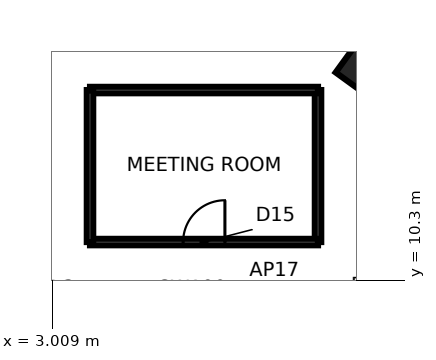
"""IFC4 building model, lengths in metres.
Left out: names, types, materials, properties, quantities, classifications, styles, units other than length and angle.
Written with IfcOpenShell. Run it as: python <this file> out.ifc"""

import sys

from ifc_helpers import new_model, si_unit, direction, frame, frame_2d, origin, origin_2d, place, context, subcontext, project, spatial, rectangle, extrude, element, fill, save


model = new_model("IFC4")
c1 = context("Model", 3, precision=1e-05, world=origin(), true_north=direction((0.0, 1.0)))
c2 = subcontext(c1, "Body", "Model", "MODEL_VIEW")
j1 = project(units=[si_unit("LENGTHUNIT", "METRE"), si_unit("PLANEANGLEUNIT", "RADIAN")], contexts=[c1])
p1 = place(None, origin())
s1 = spatial("IfcSite", under=j1, at=p1, CompositionType="ELEMENT")
p2 = place(p1, origin())
s2 = spatial("IfcBuilding", under=s1, at=p2, CompositionType="ELEMENT")
p3 = place(p2, frame((0.0, 0.0, 162.6)))
s3 = spatial("IfcBuildingStorey", under=s2, at=p3, CompositionType="ELEMENT", Elevation=162.6)
p4 = place(p3, frame((11.581, 15.94, 0.0), z_axis=(0.0, 0.0, 1.0), x_axis=(0.587785252292, 0.809016994375, 0.0)))
e1 = element("IfcColumn", 1, at=p4, inside=s3, PredefinedType="COLUMN", context=c2, shape_type="SweptSolid", body=[
    extrude(rectangle(XDim=1.6, YDim=1.6, at=origin_2d()), origin(), (0.0, 0.0, 1.0), 3.9),
])
p5 = place(p3, frame((10.0, 15.3, 0.0), z_axis=(0.0, 0.0, 1.0), x_axis=(0.0, -1.0, 0.0)))
e2 = element("IfcWall", 2, at=p5, inside=s3, PredefinedType="PARTITIONING", context=c2, shape_type="SweptSolid", body=[
    extrude(rectangle(XDim=4.0, YDim=0.17, at=frame_2d((2.0, 0.0))), origin(), (0.0, 0.0, 1.0), 3.7),
])
p6 = place(p3, frame((10.0, 11.3, 0.0), z_axis=(0.0, 0.0, 1.0), x_axis=(-1.0, 0.0, 0.0)))
e3 = element("IfcWall", 3, at=p6, inside=s3, PredefinedType="PARTITIONING", context=c2, shape_type="SweptSolid", body=[
    extrude(rectangle(XDim=6.0, YDim=0.17, at=frame_2d((3.0, 0.0))), origin(), (0.0, 0.0, 1.0), 3.7),
])
p7 = place(p6, frame((2.45, 0.0, 0.0)))
e4 = element("IfcOpeningElement", 4, at=p7, cuts=e3, PredefinedType="OPENING", context=c2, shape_type="SweptSolid", body=[
    extrude(rectangle(XDim=1.1, YDim=2.4, at=frame_2d((0.55, 1.2))), frame((0.0, 0.095, 0.0), z_axis=(0.0, -1.0, 0.0), x_axis=(1.0, 0.0, 0.0)), (0.0, 0.0, 1.0), 0.19),
])
p8 = place(p3, frame((4.0, 15.3, 0.0), z_axis=(0.0, 0.0, 1.0), x_axis=(1.0, 0.0, 0.0)))
e5 = element("IfcWall", 5, at=p8, inside=s3, PredefinedType="PARTITIONING", context=c2, shape_type="SweptSolid", body=[
    extrude(rectangle(XDim=6.0, YDim=0.17, at=frame_2d((3.0, 0.0))), origin(), (0.0, 0.0, 1.0), 3.7),
])
p9 = place(p3, frame((4.0, 11.3, 0.0), z_axis=(0.0, 0.0, 1.0), x_axis=(0.0, 1.0, 0.0)))
e6 = element("IfcWall", 6, at=p9, inside=s3, PredefinedType="PARTITIONING", context=c2, shape_type="SweptSolid", body=[
    extrude(rectangle(XDim=4.0, YDim=0.17, at=frame_2d((2.0, 0.0))), origin(), (0.0, 0.0, 1.0), 3.7),
])
p10 = place(p7, frame((1.1, 0.0, 0.0), z_axis=(0.0, 0.0, 1.0), x_axis=(-1.0, 0.0, 0.0)))
e7 = element("IfcDoor", 7, at=p10, inside=s3, OperationType="SINGLE_SWING_RIGHT", PredefinedType="DOOR", context=c2, shape_type="SweptSolid", body=[
    extrude(rectangle(XDim=1.1, YDim=2.4, at=frame_2d((0.55, 1.2))), frame((0.0, 0.025, 0.0), z_axis=(0.0, -1.0, 0.0), x_axis=(1.0, 0.0, 0.0)), (0.0, 0.0, 1.0), 0.05),
])
fill(e4, e7)
save(model, sys.argv[1])
